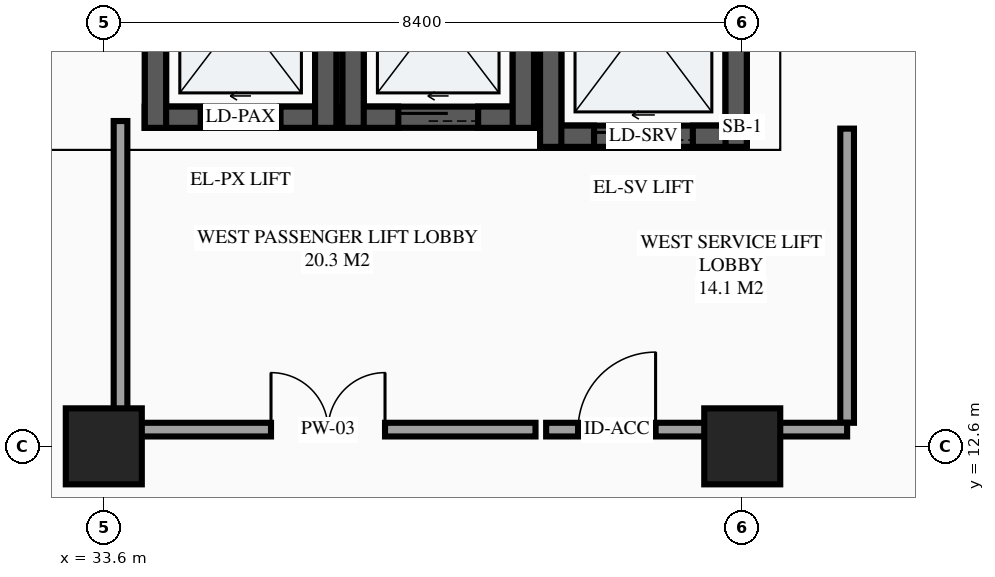
"""IFC4 building model, lengths in metres.
Left out: names, types, materials, properties, quantities, classifications, styles, units other than length and angle.
Written with IfcOpenShell. Run it as: python <this file> out.ifc"""

import sys

from ifc_helpers import new_model, si_unit, direction, frame, frame_2d, origin, origin_2d, place, context, subcontext, project, spatial, rectangle, extrude, element, fill, save


model = new_model("IFC4")
c1 = context("Model", 3, precision=1e-05, world=origin(), true_north=direction((0.0, 1.0)))
c2 = subcontext(c1, "Body", "Model", "MODEL_VIEW")
j1 = project(units=[si_unit("LENGTHUNIT", "METRE"), si_unit("PLANEANGLEUNIT", "RADIAN")], contexts=[c1])
p1 = place(None, origin())
s1 = spatial("IfcSite", under=j1, at=p1, CompositionType="ELEMENT")
p2 = place(p1, origin())
s2 = spatial("IfcBuilding", under=s1, at=p2, CompositionType="ELEMENT")
p3 = place(p2, frame((0.0, 0.0, -4.5)))
s3 = spatial("IfcBuildingStorey", under=s2, at=p3, CompositionType="ELEMENT", Elevation=-4.5)
for number, where, z_axis, x_axis in (
    (1, (33.6, 12.6, -0.36), (0.0, 0.0, 1.0), (1.0, 0.0, 0.0)),
    (2, (42.0, 12.6, -0.36), (0.0, 0.0, 1.0), (1.0, 0.0, 0.0)),
):
    element("IfcColumn", number, at=place(p3, frame(where, z_axis=z_axis, x_axis=x_axis)), inside=s3, PredefinedType="COLUMN", context=c2, shape_type="SweptSolid", body=[
        extrude(rectangle(XDim=1.0, YDim=1.0, at=origin_2d()), origin(), (0.0, 0.0, 1.0), 4.86),
    ])
p4 = place(p3, frame((34.14, 16.93, -1.5), z_axis=(0.0, 0.0, 1.0), x_axis=(1.0, 0.0, 0.0)))
e3 = element("IfcWall", 3, at=p4, inside=s3, PredefinedType="SHEAR", context=c2, shape_type="SweptSolid", body=[
    extrude(rectangle(XDim=2.52, YDim=0.28, at=frame_2d((1.26, 0.0))), origin(), (0.0, 0.0, 1.0), 1.5),
])
for number, where, z_axis, x_axis in (
    (4, (36.52, 16.79, -1.5), (0.0, 0.0, 1.0), (0.0, 1.0, 0.0)),
    (5, (34.28, 19.81, -1.5), (0.0, 0.0, 1.0), (0.0, -1.0, 0.0)),
):
    element("IfcWall", number, at=place(p3, frame(where, z_axis=z_axis, x_axis=x_axis)), inside=s3, PredefinedType="SHEAR", context=c2, shape_type="SweptSolid", body=[
        extrude(rectangle(XDim=3.02, YDim=0.28, at=frame_2d((1.51, 0.0))), origin(), (0.0, 0.0, 1.0), 1.5),
    ])
p5 = place(p3, frame((34.14, 16.93, 0.0), z_axis=(0.0, 0.0, 1.0), x_axis=(1.0, 0.0, 0.0)))
e6 = element("IfcWall", 6, at=p5, inside=s3, PredefinedType="SHEAR", context=c2, shape_type="SweptSolid", body=[
    extrude(rectangle(XDim=2.52, YDim=0.28, at=frame_2d((1.26, 0.0))), origin(), (0.0, 0.0, 1.0), 4.5),
])
p6 = place(p5, frame((0.735, 0.0, 0.0)))
e7 = element("IfcOpeningElement", 7, at=p6, cuts=e6, PredefinedType="OPENING", context=c2, shape_type="SweptSolid", body=[
    extrude(rectangle(XDim=1.05, YDim=2.2, at=frame_2d((0.525, 1.1))), frame((0.0, 0.15, 0.0), z_axis=(0.0, -1.0, 0.0), x_axis=(1.0, 0.0, 0.0)), (0.0, 0.0, 1.0), 0.3),
])
for number, where, z_axis, x_axis in (
    (8, (36.52, 16.79, 0.0), (0.0, 0.0, 1.0), (0.0, 1.0, 0.0)),
    (9, (34.28, 19.81, 0.0), (0.0, 0.0, 1.0), (0.0, -1.0, 0.0)),
):
    element("IfcWall", number, at=place(p3, frame(where, z_axis=z_axis, x_axis=x_axis)), inside=s3, PredefinedType="SHEAR", context=c2, shape_type="SweptSolid", body=[
        extrude(rectangle(XDim=3.02, YDim=0.28, at=frame_2d((1.51, 0.0))), origin(), (0.0, 0.0, 1.0), 4.5),
    ])
p7 = place(p3, frame((36.74, 16.93, -1.5), z_axis=(0.0, 0.0, 1.0), x_axis=(1.0, 0.0, 0.0)))
e10 = element("IfcWall", 10, at=p7, inside=s3, PredefinedType="SHEAR", context=c2, shape_type="SweptSolid", body=[
    extrude(rectangle(XDim=2.52, YDim=0.28, at=frame_2d((1.26, 0.0))), origin(), (0.0, 0.0, 1.0), 1.5),
])
for number, where, z_axis, x_axis in (
    (11, (39.12, 16.79, -1.5), (0.0, 0.0, 1.0), (0.0, 1.0, 0.0)),
    (12, (36.88, 19.81, -1.5), (0.0, 0.0, 1.0), (0.0, -1.0, 0.0)),
):
    element("IfcWall", number, at=place(p3, frame(where, z_axis=z_axis, x_axis=x_axis)), inside=s3, PredefinedType="SHEAR", context=c2, shape_type="SweptSolid", body=[
        extrude(rectangle(XDim=3.02, YDim=0.28, at=frame_2d((1.51, 0.0))), origin(), (0.0, 0.0, 1.0), 1.5),
    ])
p8 = place(p3, frame((36.74, 16.93, 0.0), z_axis=(0.0, 0.0, 1.0), x_axis=(1.0, 0.0, 0.0)))
e13 = element("IfcWall", 13, at=p8, inside=s3, PredefinedType="SHEAR", context=c2, shape_type="SweptSolid", body=[
    extrude(rectangle(XDim=2.52, YDim=0.28, at=frame_2d((1.26, 0.0))), origin(), (0.0, 0.0, 1.0), 4.5),
])
p9 = place(p8, frame((0.735, 0.0, 0.0)))
e14 = element("IfcOpeningElement", 14, at=p9, cuts=e13, PredefinedType="OPENING", context=c2, shape_type="SweptSolid", body=[
    extrude(rectangle(XDim=1.05, YDim=2.2, at=frame_2d((0.525, 1.1))), frame((0.0, 0.15, 0.0), z_axis=(0.0, -1.0, 0.0), x_axis=(1.0, 0.0, 0.0)), (0.0, 0.0, 1.0), 0.3),
])
for number, where, z_axis, x_axis in (
    (15, (39.12, 16.79, 0.0), (0.0, 0.0, 1.0), (0.0, 1.0, 0.0)),
    (16, (36.88, 19.81, 0.0), (0.0, 0.0, 1.0), (0.0, -1.0, 0.0)),
):
    element("IfcWall", number, at=place(p3, frame(where, z_axis=z_axis, x_axis=x_axis)), inside=s3, PredefinedType="SHEAR", context=c2, shape_type="SweptSolid", body=[
        extrude(rectangle(XDim=3.02, YDim=0.28, at=frame_2d((1.51, 0.0))), origin(), (0.0, 0.0, 1.0), 4.5),
    ])
p10 = place(p3, frame((39.34, 16.68, -1.5), z_axis=(0.0, 0.0, 1.0), x_axis=(1.0, 0.0, 0.0)))
e17 = element("IfcWall", 17, at=p10, inside=s3, PredefinedType="SHEAR", context=c2, shape_type="SweptSolid", body=[
    extrude(rectangle(XDim=2.72, YDim=0.28, at=frame_2d((1.36, 0.0))), origin(), (0.0, 0.0, 1.0), 1.5),
])
for number, where, z_axis, x_axis in (
    (18, (41.92, 16.54, -1.5), (0.0, 0.0, 1.0), (0.0, 1.0, 0.0)),
    (19, (39.48, 19.86, -1.5), (0.0, 0.0, 1.0), (0.0, -1.0, 0.0)),
):
    element("IfcWall", number, at=place(p3, frame(where, z_axis=z_axis, x_axis=x_axis)), inside=s3, PredefinedType="SHEAR", context=c2, shape_type="SweptSolid", body=[
        extrude(rectangle(XDim=3.32, YDim=0.28, at=frame_2d((1.66, 0.0))), origin(), (0.0, 0.0, 1.0), 1.5),
    ])
p11 = place(p3, frame((39.34, 16.68, 0.0), z_axis=(0.0, 0.0, 1.0), x_axis=(1.0, 0.0, 0.0)))
e20 = element("IfcWall", 20, at=p11, inside=s3, PredefinedType="SHEAR", context=c2, shape_type="SweptSolid", body=[
    extrude(rectangle(XDim=2.72, YDim=0.28, at=frame_2d((1.36, 0.0))), origin(), (0.0, 0.0, 1.0), 4.5),
])
p12 = place(p11, frame((0.71, 0.0, 0.0)))
e21 = element("IfcOpeningElement", 21, at=p12, cuts=e20, PredefinedType="OPENING", context=c2, shape_type="SweptSolid", body=[
    extrude(rectangle(XDim=1.3, YDim=2.25, at=frame_2d((0.65, 1.125))), frame((0.0, 0.15, 0.0), z_axis=(0.0, -1.0, 0.0), x_axis=(1.0, 0.0, 0.0)), (0.0, 0.0, 1.0), 0.3),
])
for number, where, z_axis, x_axis in (
    (22, (41.92, 16.54, 0.0), (0.0, 0.0, 1.0), (0.0, 1.0, 0.0)),
    (23, (39.48, 19.86, 0.0), (0.0, 0.0, 1.0), (0.0, -1.0, 0.0)),
):
    element("IfcWall", number, at=place(p3, frame(where, z_axis=z_axis, x_axis=x_axis)), inside=s3, PredefinedType="SHEAR", context=c2, shape_type="SweptSolid", body=[
        extrude(rectangle(XDim=3.32, YDim=0.28, at=frame_2d((1.66, 0.0))), origin(), (0.0, 0.0, 1.0), 4.5),
    ])
p13 = place(p3, frame((33.82, 12.82, 0.0), z_axis=(0.0, 0.0, 1.0), x_axis=(1.0, 0.0, 0.0)))
e24 = element("IfcWall", 24, at=p13, inside=s3, PredefinedType="PARTITIONING", context=c2, shape_type="SweptSolid", body=[
    extrude(rectangle(XDim=5.46, YDim=0.18, at=frame_2d((2.73, 0.0))), origin(), (0.0, 0.0, 1.0), 4.175),
])
p14 = place(p13, frame((1.98, 0.0, 0.0)))
e25 = element("IfcOpeningElement", 25, at=p14, cuts=e24, PredefinedType="OPENING", context=c2, shape_type="SweptSolid", body=[
    extrude(rectangle(XDim=1.5, YDim=2.15, at=frame_2d((0.75, 1.075))), frame((0.0, 0.1, 0.0), z_axis=(0.0, -1.0, 0.0), x_axis=(1.0, 0.0, 0.0)), (0.0, 0.0, 1.0), 0.2),
])
p15 = place(p3, frame((33.82, 12.91, 0.0), z_axis=(0.0, 0.0, 1.0), x_axis=(0.0, 1.0, 0.0)))
e26 = element("IfcWall", 26, at=p15, inside=s3, PredefinedType="PARTITIONING", context=c2, shape_type="SweptSolid", body=[
    extrude(rectangle(XDim=3.97, YDim=0.18, at=frame_2d((1.985, 0.0))), origin(), (0.0, 0.0, 1.0), 4.175),
])
p16 = place(p3, frame((39.42, 12.82, 0.0), z_axis=(0.0, 0.0, 1.0), x_axis=(1.0, 0.0, 0.0)))
e27 = element("IfcWall", 27, at=p16, inside=s3, PredefinedType="PARTITIONING", context=c2, shape_type="SweptSolid", body=[
    extrude(rectangle(XDim=3.03, YDim=0.18, at=frame_2d((1.515, 0.0))), origin(), (0.0, 0.0, 1.0), 4.175),
])
p17 = place(p16, frame((0.42, 0.0, 0.0)))
e28 = element("IfcOpeningElement", 28, at=p17, cuts=e27, PredefinedType="OPENING", context=c2, shape_type="SweptSolid", body=[
    extrude(rectangle(XDim=1.02, YDim=2.15, at=frame_2d((0.51, 1.075))), frame((0.0, 0.1, 0.0), z_axis=(0.0, -1.0, 0.0), x_axis=(1.0, 0.0, 0.0)), (0.0, 0.0, 1.0), 0.2),
])
p18 = place(p3, frame((43.38, 12.91, 0.0), z_axis=(0.0, 0.0, 1.0), x_axis=(0.0, 1.0, 0.0)))
e29 = element("IfcWall", 29, at=p18, inside=s3, PredefinedType="PARTITIONING", context=c2, shape_type="SweptSolid", body=[
    extrude(rectangle(XDim=3.87, YDim=0.18, at=frame_2d((1.935, 0.0))), origin(), (0.0, 0.0, 1.0), 4.175),
])
p19 = place(p3, frame((42.45, 12.82, 0.0), z_axis=(0.0, 0.0, 1.0), x_axis=(1.0, 0.0, 0.0)))
e30 = element("IfcWall", 30, at=p19, inside=s3, PredefinedType="PARTITIONING", context=c2, shape_type="SweptSolid", body=[
    extrude(rectangle(XDim=0.93, YDim=0.18, at=frame_2d((0.465, 0.0))), origin(), (0.0, 0.0, 1.0), 3.23),
])
p20 = place(p6, origin())
e31 = element("IfcDoor", 31, at=p20, inside=s3, OperationType="SLIDING_TO_LEFT", PredefinedType="DOOR", context=c2, shape_type="SweptSolid", body=[
    extrude(rectangle(XDim=1.05, YDim=2.2, at=frame_2d((0.525, 1.1))), frame((0.0, 0.025, 0.0), z_axis=(0.0, -1.0, 0.0), x_axis=(1.0, 0.0, 0.0)), (0.0, 0.0, 1.0), 0.05),
])
fill(e7, e31)
p21 = place(p9, origin())
e32 = element("IfcDoor", 32, at=p21, inside=s3, OperationType="SLIDING_TO_LEFT", PredefinedType="DOOR", context=c2, shape_type="SweptSolid", body=[
    extrude(rectangle(XDim=1.05, YDim=2.2, at=frame_2d((0.525, 1.1))), frame((0.0, 0.025, 0.0), z_axis=(0.0, -1.0, 0.0), x_axis=(1.0, 0.0, 0.0)), (0.0, 0.0, 1.0), 0.05),
])
fill(e14, e32)
p22 = place(p12, origin())
e33 = element("IfcDoor", 33, at=p22, inside=s3, OperationType="SLIDING_TO_LEFT", PredefinedType="DOOR", context=c2, shape_type="SweptSolid", body=[
    extrude(rectangle(XDim=1.3, YDim=2.25, at=frame_2d((0.65, 1.125))), frame((0.0, 0.025, 0.0), z_axis=(0.0, -1.0, 0.0), x_axis=(1.0, 0.0, 0.0)), (0.0, 0.0, 1.0), 0.05),
])
fill(e21, e33)
p23 = place(p14, origin())
e34 = element("IfcDoor", 34, at=p23, inside=s3, OperationType="DOUBLE_DOOR_SINGLE_SWING", PredefinedType="DOOR", context=c2, shape_type="SweptSolid", body=[
    extrude(rectangle(XDim=1.5, YDim=2.15, at=frame_2d((0.75, 1.075))), frame((0.0, 0.025, 0.0), z_axis=(0.0, -1.0, 0.0), x_axis=(1.0, 0.0, 0.0)), (0.0, 0.0, 1.0), 0.05),
])
fill(e25, e34)
p24 = place(p17, origin())
e35 = element("IfcDoor", 35, at=p24, inside=s3, OperationType="SINGLE_SWING_RIGHT", PredefinedType="DOOR", context=c2, shape_type="SweptSolid", body=[
    extrude(rectangle(XDim=1.02, YDim=2.15, at=frame_2d((0.51, 1.075))), frame((0.0, 0.025, 0.0), z_axis=(0.0, -1.0, 0.0), x_axis=(1.0, 0.0, 0.0)), (0.0, 0.0, 1.0), 0.05),
])
fill(e28, e35)
save(model, sys.argv[1])
